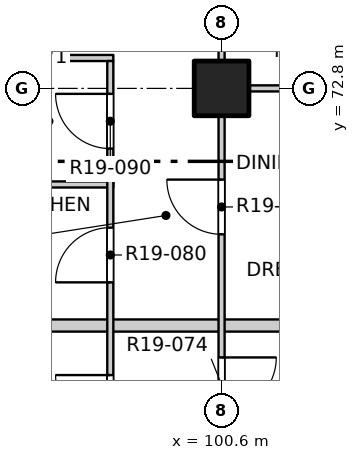
"""IFC4 building model, lengths in metres.
Left out: names, types, materials, properties, quantities, classifications, styles, units other than length and angle.
Written with IfcOpenShell. Run it as: python <this file> out.ifc"""

import sys

from ifc_helpers import new_model, si_unit, direction, frame, frame_2d, origin, origin_2d, place, context, subcontext, project, spatial, rectangle, extrude, element, fill, save


model = new_model("IFC4")
c1 = context("Model", 3, precision=1e-05, world=origin(), true_north=direction((0.0, 1.0)))
c2 = subcontext(c1, "Body", "Model", "MODEL_VIEW")
j1 = project(units=[si_unit("LENGTHUNIT", "METRE"), si_unit("PLANEANGLEUNIT", "RADIAN")], contexts=[c1])
p1 = place(None, origin())
s1 = spatial("IfcSite", under=j1, at=p1, CompositionType="ELEMENT")
p2 = place(p1, origin())
s2 = spatial("IfcBuilding", under=s1, at=p2, CompositionType="ELEMENT")
p3 = place(p2, frame((0.0, 0.0, 197.3)))
s3 = spatial("IfcBuildingStorey", under=s2, at=p3, CompositionType="ELEMENT", Elevation=197.3)
p4 = place(p3, frame((100.6, 72.8, -0.3), z_axis=(0.0, 0.0, 1.0), x_axis=(1.0, 0.0, 0.0)))
e1 = element("IfcColumn", 1, at=p4, inside=s3, PredefinedType="COLUMN", context=c2, shape_type="SweptSolid", body=[
    extrude(rectangle(XDim=0.9, YDim=0.9, at=origin_2d()), origin(), (0.0, 0.0, 1.0), 3.45),
])
p5 = place(p3, frame((96.6, 68.9, 0.0), z_axis=(0.0, 0.0, 1.0), x_axis=(1.0, 0.0, 0.0)))
e2 = element("IfcWall", 2, at=p5, inside=s3, PredefinedType="PARTITIONING", context=c2, shape_type="SweptSolid", body=[
    extrude(rectangle(XDim=11.5, YDim=0.2, at=frame_2d((5.75, 0.0))), origin(), (0.0, 0.0, 1.0), 2.55),
])
p6 = place(p3, frame((96.6, 71.22, 0.0), z_axis=(0.0, 0.0, 1.0), x_axis=(1.0, 0.0, 0.0)))
e3 = element("IfcWall", 3, at=p6, inside=s3, PredefinedType="PARTITIONING", context=c2, shape_type="SweptSolid", body=[
    extrude(rectangle(XDim=2.22, YDim=0.1, at=frame_2d((1.11, 0.0))), origin(), (0.0, 0.0, 1.0), 3.15),
])
p7 = place(p3, frame((100.55, 72.8, 0.0), z_axis=(0.0, 0.0, 1.0), x_axis=(1.0, 0.0, 0.0)))
e4 = element("IfcWall", 4, at=p7, inside=s3, PredefinedType="PARTITIONING", context=c2, shape_type="SweptSolid", body=[
    extrude(rectangle(XDim=7.55, YDim=0.1, at=frame_2d((3.775, 0.0))), origin(), (0.0, 0.0, 1.0), 3.15),
])
p8 = place(p3, frame((96.6, 73.3, 0.0), z_axis=(0.0, 0.0, 1.0), x_axis=(1.0, 0.0, 0.0)))
e5 = element("IfcWall", 5, at=p8, inside=s3, PredefinedType="PARTITIONING", context=c2, shape_type="SweptSolid", body=[
    extrude(rectangle(XDim=2.22, YDim=0.1, at=frame_2d((1.11, 0.0))), origin(), (0.0, 0.0, 1.0), 3.15),
])
p9 = place(p3, frame((98.77, 63.65, 0.0), z_axis=(0.0, 0.0, 1.0), x_axis=(0.0, 1.0, 0.0)))
e6 = element("IfcWall", 6, at=p9, inside=s3, PredefinedType="PARTITIONING", context=c2, shape_type="SweptSolid", body=[
    extrude(rectangle(XDim=9.6, YDim=0.1, at=frame_2d((4.8, 0.0))), origin(), (0.0, 0.0, 1.0), 3.15),
])
p10 = place(p9, frame((0.885, 0.0, 0.0)))
e7 = element("IfcOpeningElement", 7, at=p10, cuts=e6, PredefinedType="OPENING", context=c2, shape_type="SweptSolid", body=[
    extrude(rectangle(XDim=0.9, YDim=2.1, at=frame_2d((0.45, 1.05))), frame((0.0, 0.06, 0.0), z_axis=(0.0, -1.0, 0.0), x_axis=(1.0, 0.0, 0.0)), (0.0, 0.0, 1.0), 0.12),
])
p11 = place(p9, frame((3.535, 0.0, 0.0)))
e8 = element("IfcOpeningElement", 8, at=p11, cuts=e6, PredefinedType="OPENING", context=c2, shape_type="SweptSolid", body=[
    extrude(rectangle(XDim=0.9, YDim=2.1, at=frame_2d((0.45, 1.05))), frame((0.0, 0.06, 0.0), z_axis=(0.0, -1.0, 0.0), x_axis=(1.0, 0.0, 0.0)), (0.0, 0.0, 1.0), 0.12),
])
p12 = place(p9, frame((5.96, 0.0, 0.0)))
e9 = element("IfcOpeningElement", 9, at=p12, cuts=e6, PredefinedType="OPENING", context=c2, shape_type="SweptSolid", body=[
    extrude(rectangle(XDim=0.9, YDim=2.1, at=frame_2d((0.45, 1.05))), frame((0.0, 0.06, 0.0), z_axis=(0.0, -1.0, 0.0), x_axis=(1.0, 0.0, 0.0)), (0.0, 0.0, 1.0), 0.12),
])
p13 = place(p9, frame((8.16, 0.0, 0.0)))
e10 = element("IfcOpeningElement", 10, at=p13, cuts=e6, PredefinedType="OPENING", context=c2, shape_type="SweptSolid", body=[
    extrude(rectangle(XDim=0.9, YDim=2.1, at=frame_2d((0.45, 1.05))), frame((0.0, 0.06, 0.0), z_axis=(0.0, -1.0, 0.0), x_axis=(1.0, 0.0, 0.0)), (0.0, 0.0, 1.0), 0.12),
])
p14 = place(p3, frame((100.6, 41.9, 0.0), z_axis=(0.0, 0.0, 1.0), x_axis=(0.0, 1.0, 0.0)))
e11 = element("IfcWall", 11, at=p14, inside=s3, PredefinedType="PARTITIONING", context=c2, shape_type="SweptSolid", body=[
    extrude(rectangle(XDim=46.2, YDim=0.1, at=frame_2d((23.1, 0.0))), origin(), (0.0, 0.0, 1.0), 3.15),
])
p15 = place(p14, frame((1.2, 0.0, 0.0)))
e12 = element("IfcOpeningElement", 12, at=p15, cuts=e11, PredefinedType="OPENING", context=c2, shape_type="SweptSolid", body=[
    extrude(rectangle(XDim=0.9, YDim=2.1, at=frame_2d((0.45, 1.05))), frame((0.0, 0.06, 0.0), z_axis=(0.0, -1.0, 0.0), x_axis=(1.0, 0.0, 0.0)), (0.0, 0.0, 1.0), 0.12),
])
p16 = place(p14, frame((5.1, 0.0, 0.0)))
e13 = element("IfcOpeningElement", 13, at=p16, cuts=e11, PredefinedType="OPENING", context=c2, shape_type="SweptSolid", body=[
    extrude(rectangle(XDim=0.9, YDim=2.1, at=frame_2d((0.45, 1.05))), frame((0.0, 0.06, 0.0), z_axis=(0.0, -1.0, 0.0), x_axis=(1.0, 0.0, 0.0)), (0.0, 0.0, 1.0), 0.12),
])
p17 = place(p14, frame((9.975, 0.0, 0.0)))
e14 = element("IfcOpeningElement", 14, at=p17, cuts=e11, PredefinedType="OPENING", context=c2, shape_type="SweptSolid", body=[
    extrude(rectangle(XDim=0.9, YDim=2.1, at=frame_2d((0.45, 1.05))), frame((0.0, 0.06, 0.0), z_axis=(0.0, -1.0, 0.0), x_axis=(1.0, 0.0, 0.0)), (0.0, 0.0, 1.0), 0.12),
])
p18 = place(p14, frame((12.9, 0.0, 0.0)))
e15 = element("IfcOpeningElement", 15, at=p18, cuts=e11, PredefinedType="OPENING", context=c2, shape_type="SweptSolid", body=[
    extrude(rectangle(XDim=0.9, YDim=2.1, at=frame_2d((0.45, 1.05))), frame((0.0, 0.06, 0.0), z_axis=(0.0, -1.0, 0.0), x_axis=(1.0, 0.0, 0.0)), (0.0, 0.0, 1.0), 0.12),
])
p19 = place(p14, frame((17.775, 0.0, 0.0)))
e16 = element("IfcOpeningElement", 16, at=p19, cuts=e11, PredefinedType="OPENING", context=c2, shape_type="SweptSolid", body=[
    extrude(rectangle(XDim=0.9, YDim=2.1, at=frame_2d((0.45, 1.05))), frame((0.0, 0.06, 0.0), z_axis=(0.0, -1.0, 0.0), x_axis=(1.0, 0.0, 0.0)), (0.0, 0.0, 1.0), 0.12),
])
p20 = place(p14, frame((20.7, 0.0, 0.0)))
e17 = element("IfcOpeningElement", 17, at=p20, cuts=e11, PredefinedType="OPENING", context=c2, shape_type="SweptSolid", body=[
    extrude(rectangle(XDim=0.9, YDim=2.1, at=frame_2d((0.45, 1.05))), frame((0.0, 0.06, 0.0), z_axis=(0.0, -1.0, 0.0), x_axis=(1.0, 0.0, 0.0)), (0.0, 0.0, 1.0), 0.12),
])
p21 = place(p14, frame((25.575, 0.0, 0.0)))
e18 = element("IfcOpeningElement", 18, at=p21, cuts=e11, PredefinedType="OPENING", context=c2, shape_type="SweptSolid", body=[
    extrude(rectangle(XDim=0.9, YDim=2.1, at=frame_2d((0.45, 1.05))), frame((0.0, 0.06, 0.0), z_axis=(0.0, -1.0, 0.0), x_axis=(1.0, 0.0, 0.0)), (0.0, 0.0, 1.0), 0.12),
])
p22 = place(p14, frame((28.5, 0.0, 0.0)))
e19 = element("IfcOpeningElement", 19, at=p22, cuts=e11, PredefinedType="OPENING", context=c2, shape_type="SweptSolid", body=[
    extrude(rectangle(XDim=0.9, YDim=2.1, at=frame_2d((0.45, 1.05))), frame((0.0, 0.06, 0.0), z_axis=(0.0, -1.0, 0.0), x_axis=(1.0, 0.0, 0.0)), (0.0, 0.0, 1.0), 0.12),
])
p23 = place(p14, frame((33.375, 0.0, 0.0)))
e20 = element("IfcOpeningElement", 20, at=p23, cuts=e11, PredefinedType="OPENING", context=c2, shape_type="SweptSolid", body=[
    extrude(rectangle(XDim=0.9, YDim=2.1, at=frame_2d((0.45, 1.05))), frame((0.0, 0.06, 0.0), z_axis=(0.0, -1.0, 0.0), x_axis=(1.0, 0.0, 0.0)), (0.0, 0.0, 1.0), 0.12),
])
p24 = place(p14, frame((37.225, 0.0, 0.0)))
e21 = element("IfcOpeningElement", 21, at=p24, cuts=e11, PredefinedType="OPENING", context=c2, shape_type="SweptSolid", body=[
    extrude(rectangle(XDim=0.9, YDim=2.1, at=frame_2d((0.45, 1.05))), frame((0.0, 0.06, 0.0), z_axis=(0.0, -1.0, 0.0), x_axis=(1.0, 0.0, 0.0)), (0.0, 0.0, 1.0), 0.12),
])
p25 = place(p14, frame((41.175, 0.0, 0.0)))
e22 = element("IfcOpeningElement", 22, at=p25, cuts=e11, PredefinedType="OPENING", context=c2, shape_type="SweptSolid", body=[
    extrude(rectangle(XDim=0.9, YDim=2.1, at=frame_2d((0.45, 1.05))), frame((0.0, 0.06, 0.0), z_axis=(0.0, -1.0, 0.0), x_axis=(1.0, 0.0, 0.0)), (0.0, 0.0, 1.0), 0.12),
])
p26 = place(p14, frame((44.1, 0.0, 0.0)))
e23 = element("IfcOpeningElement", 23, at=p26, cuts=e11, PredefinedType="OPENING", context=c2, shape_type="SweptSolid", body=[
    extrude(rectangle(XDim=0.9, YDim=2.1, at=frame_2d((0.45, 1.05))), frame((0.0, 0.06, 0.0), z_axis=(0.0, -1.0, 0.0), x_axis=(1.0, 0.0, 0.0)), (0.0, 0.0, 1.0), 0.12),
])
p27 = place(p11, origin())
e24 = element("IfcDoor", 24, at=p27, inside=s3, OperationType="SINGLE_SWING_RIGHT", PredefinedType="DOOR", context=c2, shape_type="SweptSolid", body=[
    extrude(rectangle(XDim=0.9, YDim=2.1, at=frame_2d((0.45, 1.05))), frame((0.0, 0.025, 0.0), z_axis=(0.0, -1.0, 0.0), x_axis=(1.0, 0.0, 0.0)), (0.0, 0.0, 1.0), 0.05),
])
fill(e8, e24)
p28 = place(p21, origin())
e25 = element("IfcDoor", 25, at=p28, inside=s3, OperationType="SINGLE_SWING_LEFT", PredefinedType="DOOR", context=c2, shape_type="SweptSolid", body=[
    extrude(rectangle(XDim=0.9, YDim=2.1, at=frame_2d((0.45, 1.05))), frame((0.0, 0.025, 0.0), z_axis=(0.0, -1.0, 0.0), x_axis=(1.0, 0.0, 0.0)), (0.0, 0.0, 1.0), 0.05),
])
fill(e18, e25)
p29 = place(p12, origin())
e26 = element("IfcDoor", 26, at=p29, inside=s3, OperationType="SINGLE_SWING_LEFT", PredefinedType="DOOR", context=c2, shape_type="SweptSolid", body=[
    extrude(rectangle(XDim=0.9, YDim=2.1, at=frame_2d((0.45, 1.05))), frame((0.0, 0.025, 0.0), z_axis=(0.0, -1.0, 0.0), x_axis=(1.0, 0.0, 0.0)), (0.0, 0.0, 1.0), 0.05),
])
fill(e9, e26)
p30 = place(p22, origin())
e27 = element("IfcDoor", 27, at=p30, inside=s3, OperationType="SINGLE_SWING_RIGHT", PredefinedType="DOOR", context=c2, shape_type="SweptSolid", body=[
    extrude(rectangle(XDim=0.9, YDim=2.1, at=frame_2d((0.45, 1.05))), frame((0.0, 0.025, 0.0), z_axis=(0.0, -1.0, 0.0), x_axis=(1.0, 0.0, 0.0)), (0.0, 0.0, 1.0), 0.05),
])
fill(e19, e27)
p31 = place(p13, origin())
e28 = element("IfcDoor", 28, at=p31, inside=s3, OperationType="SINGLE_SWING_RIGHT", PredefinedType="DOOR", context=c2, shape_type="SweptSolid", body=[
    extrude(rectangle(XDim=0.9, YDim=2.1, at=frame_2d((0.45, 1.05))), frame((0.0, 0.025, 0.0), z_axis=(0.0, -1.0, 0.0), x_axis=(1.0, 0.0, 0.0)), (0.0, 0.0, 1.0), 0.05),
])
fill(e10, e28)
save(model, sys.argv[1])
